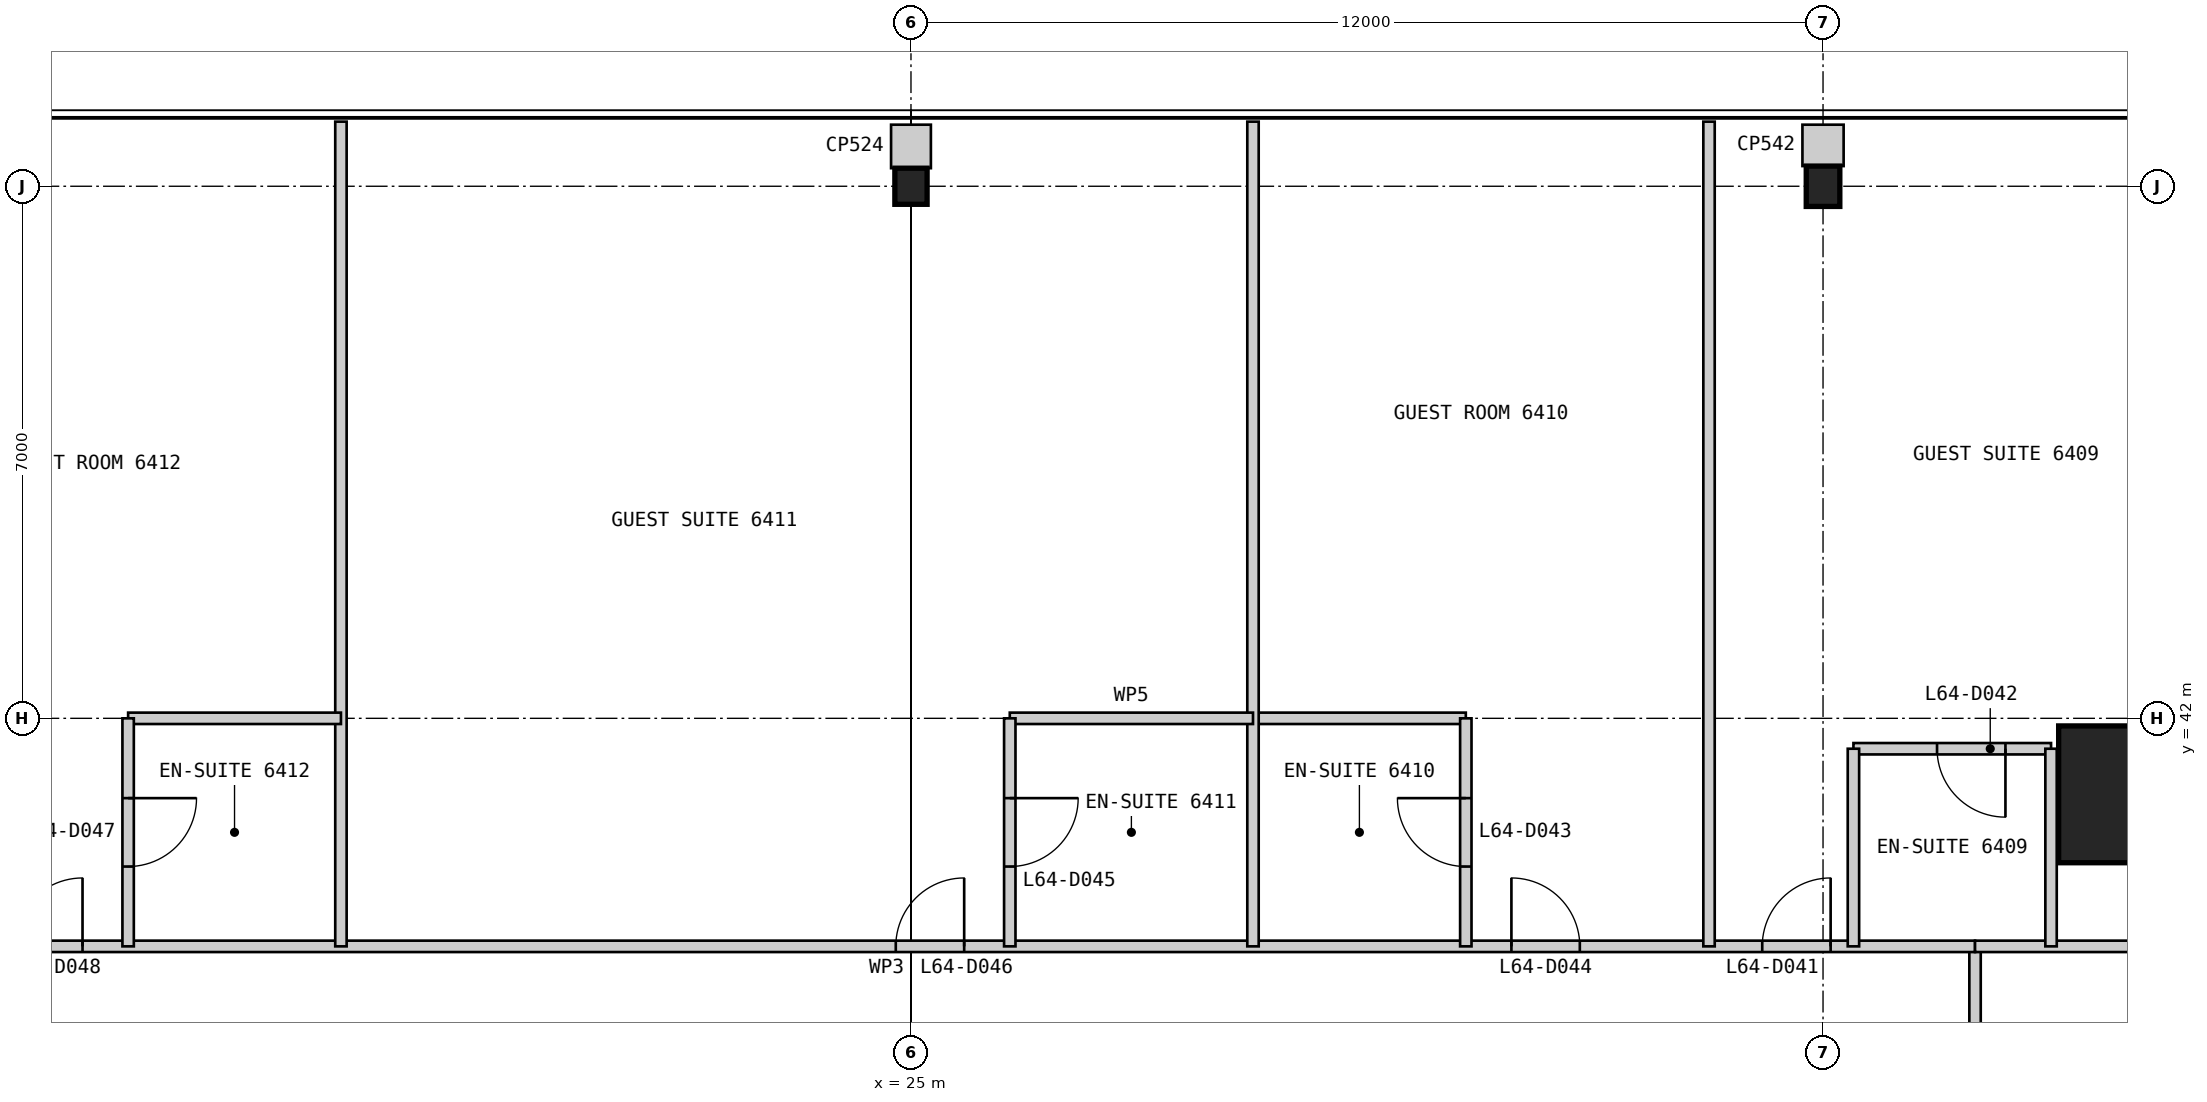
"""IFC4 building model, lengths in metres.
Left out: names, types, materials, properties, quantities, classifications, styles, units other than length and angle.
Written with IfcOpenShell. Run it as: python <this file> out.ifc"""

import sys

from ifc_helpers import new_model, si_unit, direction, frame, frame_2d, origin, origin_2d, place, context, subcontext, project, spatial, rectangle, i_section, extrude, element, fill, save


model = new_model("IFC4")
c1 = context("Model", 3, precision=1e-05, world=origin(), true_north=direction((0.0, 1.0)))
c2 = subcontext(c1, "Body", "Model", "MODEL_VIEW")
j1 = project(units=[si_unit("LENGTHUNIT", "METRE"), si_unit("PLANEANGLEUNIT", "RADIAN")], contexts=[c1])
p1 = place(None, origin())
s1 = spatial("IfcSite", under=j1, at=p1, CompositionType="ELEMENT")
p2 = place(p1, origin())
s2 = spatial("IfcBuilding", under=s1, at=p2, CompositionType="ELEMENT")
p3 = place(p2, frame((0.0, 0.0, 269.6)))
s3 = spatial("IfcBuildingStorey", under=s2, at=p3, CompositionType="ELEMENT", Elevation=269.6)
p4 = place(p3, frame((41.0, 41.0, 0.0), z_axis=(0.0, 0.0, 1.0), x_axis=(1.0, 0.0, 0.0)))
e1 = element("IfcColumn", 1, at=p4, inside=s3, PredefinedType="COLUMN", context=c2, shape_type="SweptSolid", body=[
    extrude(rectangle(XDim=1.8, YDim=1.8, at=origin_2d()), origin(), (0.0, 0.0, 1.0), 3.4),
])
p5 = place(p3, frame((37.0, 49.0, 0.0), z_axis=(0.0, 0.0, 1.0), x_axis=(1.0, 0.0, 0.0)))
e2 = element("IfcColumn", 2, at=p5, inside=s3, PredefinedType="COLUMN", context=c2, shape_type="SweptSolid", body=[
    extrude(i_section(OverallWidth=0.442, OverallDepth=0.531, WebThickness=0.066, FlangeThickness=0.106, at=origin_2d()), origin(), (0.0, 0.0, 1.0), 3.4),
])
p6 = place(p3, frame((25.0, 49.0, 0.0), z_axis=(0.0, 0.0, 1.0), x_axis=(1.0, 0.0, 0.0)))
e3 = element("IfcColumn", 3, at=p6, inside=s3, PredefinedType="COLUMN", context=c2, shape_type="SweptSolid", body=[
    extrude(i_section(OverallWidth=0.424, OverallDepth=0.475, WebThickness=0.048, FlangeThickness=0.077, at=origin_2d()), origin(), (0.0, 0.0, 1.0), 3.4),
])
p7 = place(p3, frame((39.0, 11.0, 0.0), z_axis=(0.0, 0.0, 1.0), x_axis=(0.0, 1.0, 0.0)))
e4 = element("IfcWall", 4, at=p7, inside=s3, PredefinedType="PARTITIONING", context=c2, shape_type="SweptSolid", body=[
    extrude(rectangle(XDim=28.0, YDim=0.15, at=frame_2d((14.0, 0.0))), origin(), (0.0, 0.0, 1.0), 2.844),
])
p8 = place(p7, frame((2.075, 0.0, 0.0)))
e5 = element("IfcOpeningElement", 5, at=p8, cuts=e4, PredefinedType="OPENING", context=c2, shape_type="SweptSolid", body=[
    extrude(rectangle(XDim=0.9, YDim=2.1, at=frame_2d((0.45, 1.05))), frame((0.0, 0.085, 0.0), z_axis=(0.0, -1.0, 0.0), x_axis=(1.0, 0.0, 0.0)), (0.0, 0.0, 1.0), 0.17),
])
p9 = place(p7, frame((5.2, 0.0, 0.0)))
e6 = element("IfcOpeningElement", 6, at=p9, cuts=e4, PredefinedType="OPENING", context=c2, shape_type="SweptSolid", body=[
    extrude(rectangle(XDim=0.9, YDim=2.1, at=frame_2d((0.45, 1.05))), frame((0.0, 0.085, 0.0), z_axis=(0.0, -1.0, 0.0), x_axis=(1.0, 0.0, 0.0)), (0.0, 0.0, 1.0), 0.17),
])
p10 = place(p7, frame((13.3, 0.0, 0.0)))
e7 = element("IfcOpeningElement", 7, at=p10, cuts=e4, PredefinedType="OPENING", context=c2, shape_type="SweptSolid", body=[
    extrude(rectangle(XDim=0.9, YDim=2.1, at=frame_2d((0.45, 1.05))), frame((0.0, 0.085, 0.0), z_axis=(0.0, -1.0, 0.0), x_axis=(1.0, 0.0, 0.0)), (0.0, 0.0, 1.0), 0.17),
])
p11 = place(p7, frame((24.9, 0.0, 0.0)))
e8 = element("IfcOpeningElement", 8, at=p11, cuts=e4, PredefinedType="OPENING", context=c2, shape_type="SweptSolid", body=[
    extrude(rectangle(XDim=0.9, YDim=2.1, at=frame_2d((0.45, 1.05))), frame((0.0, 0.085, 0.0), z_axis=(0.0, -1.0, 0.0), x_axis=(1.0, 0.0, 0.0)), (0.0, 0.0, 1.0), 0.17),
])
p12 = place(p3, frame((39.0, 39.0, 0.0), z_axis=(0.0, 0.0, 1.0), x_axis=(-1.0, 0.0, 0.0)))
e9 = element("IfcWall", 9, at=p12, inside=s3, PredefinedType="PARTITIONING", context=c2, shape_type="SweptSolid", body=[
    extrude(rectangle(XDim=28.0, YDim=0.15, at=frame_2d((14.0, 0.0))), origin(), (0.0, 0.0, 1.0), 2.844),
])
p13 = place(p12, frame((1.9, 0.0, 0.0)))
e10 = element("IfcOpeningElement", 10, at=p13, cuts=e9, PredefinedType="OPENING", context=c2, shape_type="SweptSolid", body=[
    extrude(rectangle(XDim=0.9, YDim=2.1, at=frame_2d((0.45, 1.05))), frame((0.0, 0.085, 0.0), z_axis=(0.0, -1.0, 0.0), x_axis=(1.0, 0.0, 0.0)), (0.0, 0.0, 1.0), 0.17),
])
p14 = place(p12, frame((5.2, 0.0, 0.0)))
e11 = element("IfcOpeningElement", 11, at=p14, cuts=e9, PredefinedType="OPENING", context=c2, shape_type="SweptSolid", body=[
    extrude(rectangle(XDim=0.9, YDim=2.1, at=frame_2d((0.45, 1.05))), frame((0.0, 0.085, 0.0), z_axis=(0.0, -1.0, 0.0), x_axis=(1.0, 0.0, 0.0)), (0.0, 0.0, 1.0), 0.17),
])
p15 = place(p12, frame((13.3, 0.0, 0.0)))
e12 = element("IfcOpeningElement", 12, at=p15, cuts=e9, PredefinedType="OPENING", context=c2, shape_type="SweptSolid", body=[
    extrude(rectangle(XDim=0.9, YDim=2.1, at=frame_2d((0.45, 1.05))), frame((0.0, 0.085, 0.0), z_axis=(0.0, -1.0, 0.0), x_axis=(1.0, 0.0, 0.0)), (0.0, 0.0, 1.0), 0.17),
])
p16 = place(p12, frame((24.9, 0.0, 0.0)))
e13 = element("IfcOpeningElement", 13, at=p16, cuts=e9, PredefinedType="OPENING", context=c2, shape_type="SweptSolid", body=[
    extrude(rectangle(XDim=0.9, YDim=2.1, at=frame_2d((0.45, 1.05))), frame((0.0, 0.085, 0.0), z_axis=(0.0, -1.0, 0.0), x_axis=(1.0, 0.0, 0.0)), (0.0, 0.0, 1.0), 0.17),
])
p17 = place(p3, frame((49.85, 39.0, 0.0), z_axis=(0.0, 0.0, 1.0), x_axis=(-1.0, 0.0, 0.0)))
e14 = element("IfcWall", 14, at=p17, inside=s3, PredefinedType="PARTITIONING", context=c2, shape_type="SweptSolid", body=[
    extrude(rectangle(XDim=10.85, YDim=0.15, at=frame_2d((5.425, 0.0))), origin(), (0.0, 0.0, 1.0), 2.844),
])
p18 = place(p3, frame((40.0, 41.6, 0.0), z_axis=(0.0, 0.0, 1.0), x_axis=(-1.0, 0.0, 0.0)))
e15 = element("IfcWall", 15, at=p18, inside=s3, PredefinedType="PARTITIONING", context=c2, shape_type="SweptSolid", body=[
    extrude(rectangle(XDim=2.6, YDim=0.15, at=frame_2d((1.3, 0.0))), origin(), (0.0, 0.0, 1.0), 3.25),
])
p19 = place(p18, frame((0.6, 0.0, 0.0)))
e16 = element("IfcOpeningElement", 16, at=p19, cuts=e15, PredefinedType="OPENING", context=c2, shape_type="SweptSolid", body=[
    extrude(rectangle(XDim=0.9, YDim=2.1, at=frame_2d((0.45, 1.05))), frame((0.0, 0.085, 0.0), z_axis=(0.0, -1.0, 0.0), x_axis=(1.0, 0.0, 0.0)), (0.0, 0.0, 1.0), 0.17),
])
for number, where, z_axis, x_axis in (
    (17, (40.0, 41.6, 0.0), (0.0, 0.0, 1.0), (0.0, -1.0, 0.0)),
    (18, (37.4, 41.6, 0.0), (0.0, 0.0, 1.0), (0.0, -1.0, 0.0)),
):
    element("IfcWall", number, at=place(p3, frame(where, z_axis=z_axis, x_axis=x_axis)), inside=s3, PredefinedType="PARTITIONING", context=c2, shape_type="SweptSolid", body=[
        extrude(rectangle(XDim=2.6, YDim=0.15, at=frame_2d((1.3, 0.0))), origin(), (0.0, 0.0, 1.0), 3.25),
    ])
p20 = place(p3, frame((35.5, 49.85, 0.0), z_axis=(0.0, 0.0, 1.0), x_axis=(0.0, -1.0, 0.0)))
e19 = element("IfcWall", 19, at=p20, inside=s3, PredefinedType="PARTITIONING", context=c2, shape_type="SweptSolid", body=[
    extrude(rectangle(XDim=10.85, YDim=0.15, at=frame_2d((5.425, 0.0))), origin(), (0.0, 0.0, 1.0), 3.25),
])
p21 = place(p3, frame((32.3, 42.0, 0.0), z_axis=(0.0, 0.0, 1.0), x_axis=(-1.0, 0.0, 0.0)))
e20 = element("IfcWall", 20, at=p21, inside=s3, PredefinedType="PARTITIONING", context=c2, shape_type="SweptSolid", body=[
    extrude(rectangle(XDim=2.8, YDim=0.15, at=frame_2d((1.4, 0.0))), origin(), (0.0, 0.0, 1.0), 3.25),
])
p22 = place(p3, frame((32.3, 42.0, 0.0), z_axis=(0.0, 0.0, 1.0), x_axis=(0.0, -1.0, 0.0)))
e21 = element("IfcWall", 21, at=p22, inside=s3, PredefinedType="PARTITIONING", context=c2, shape_type="SweptSolid", body=[
    extrude(rectangle(XDim=3.0, YDim=0.15, at=frame_2d((1.5, 0.0))), origin(), (0.0, 0.0, 1.0), 3.25),
])
p23 = place(p22, frame((1.05, 0.0, 0.0)))
e22 = element("IfcOpeningElement", 22, at=p23, cuts=e21, PredefinedType="OPENING", context=c2, shape_type="SweptSolid", body=[
    extrude(rectangle(XDim=0.9, YDim=2.1, at=frame_2d((0.45, 1.05))), frame((0.0, 0.085, 0.0), z_axis=(0.0, -1.0, 0.0), x_axis=(1.0, 0.0, 0.0)), (0.0, 0.0, 1.0), 0.17),
])
p24 = place(p3, frame((29.5, 49.85, 0.0), z_axis=(0.0, 0.0, 1.0), x_axis=(0.0, -1.0, 0.0)))
e23 = element("IfcWall", 23, at=p24, inside=s3, PredefinedType="PARTITIONING", context=c2, shape_type="SweptSolid", body=[
    extrude(rectangle(XDim=10.85, YDim=0.15, at=frame_2d((5.425, 0.0))), origin(), (0.0, 0.0, 1.0), 3.25),
])
p25 = place(p3, frame((29.5, 42.0, 0.0), z_axis=(0.0, 0.0, 1.0), x_axis=(-1.0, 0.0, 0.0)))
e24 = element("IfcWall", 24, at=p25, inside=s3, PredefinedType="PARTITIONING", context=c2, shape_type="SweptSolid", body=[
    extrude(rectangle(XDim=3.2, YDim=0.15, at=frame_2d((1.6, 0.0))), origin(), (0.0, 0.0, 1.0), 3.25),
])
p26 = place(p3, frame((26.3, 42.0, 0.0), z_axis=(0.0, 0.0, 1.0), x_axis=(0.0, -1.0, 0.0)))
e25 = element("IfcWall", 25, at=p26, inside=s3, PredefinedType="PARTITIONING", context=c2, shape_type="SweptSolid", body=[
    extrude(rectangle(XDim=3.0, YDim=0.15, at=frame_2d((1.5, 0.0))), origin(), (0.0, 0.0, 1.0), 3.25),
])
p27 = place(p26, frame((1.05, 0.0, 0.0)))
e26 = element("IfcOpeningElement", 26, at=p27, cuts=e25, PredefinedType="OPENING", context=c2, shape_type="SweptSolid", body=[
    extrude(rectangle(XDim=0.9, YDim=2.1, at=frame_2d((0.45, 1.05))), frame((0.0, 0.085, 0.0), z_axis=(0.0, -1.0, 0.0), x_axis=(1.0, 0.0, 0.0)), (0.0, 0.0, 1.0), 0.17),
])
p28 = place(p3, frame((17.5, 49.85, 0.0), z_axis=(0.0, 0.0, 1.0), x_axis=(0.0, -1.0, 0.0)))
e27 = element("IfcWall", 27, at=p28, inside=s3, PredefinedType="PARTITIONING", context=c2, shape_type="SweptSolid", body=[
    extrude(rectangle(XDim=10.85, YDim=0.15, at=frame_2d((5.425, 0.0))), origin(), (0.0, 0.0, 1.0), 3.25),
])
p29 = place(p3, frame((17.5, 42.0, 0.0), z_axis=(0.0, 0.0, 1.0), x_axis=(-1.0, 0.0, 0.0)))
e28 = element("IfcWall", 28, at=p29, inside=s3, PredefinedType="PARTITIONING", context=c2, shape_type="SweptSolid", body=[
    extrude(rectangle(XDim=2.8, YDim=0.15, at=frame_2d((1.4, 0.0))), origin(), (0.0, 0.0, 1.0), 3.25),
])
p30 = place(p3, frame((14.7, 42.0, 0.0), z_axis=(0.0, 0.0, 1.0), x_axis=(0.0, -1.0, 0.0)))
e29 = element("IfcWall", 29, at=p30, inside=s3, PredefinedType="PARTITIONING", context=c2, shape_type="SweptSolid", body=[
    extrude(rectangle(XDim=3.0, YDim=0.15, at=frame_2d((1.5, 0.0))), origin(), (0.0, 0.0, 1.0), 3.25),
])
p31 = place(p30, frame((1.05, 0.0, 0.0)))
e30 = element("IfcOpeningElement", 30, at=p31, cuts=e29, PredefinedType="OPENING", context=c2, shape_type="SweptSolid", body=[
    extrude(rectangle(XDim=0.9, YDim=2.1, at=frame_2d((0.45, 1.05))), frame((0.0, 0.085, 0.0), z_axis=(0.0, -1.0, 0.0), x_axis=(1.0, 0.0, 0.0)), (0.0, 0.0, 1.0), 0.17),
])
p32 = place(p3, frame((37.0, 49.81, 0.0), z_axis=(0.0, 0.0, 1.0), x_axis=(0.0, -1.0, 0.0)))
e31 = element("IfcWall", 31, at=p32, inside=s3, PredefinedType="PARTITIONING", context=c2, shape_type="SweptSolid", body=[
    extrude(rectangle(XDim=0.545, YDim=0.542, at=frame_2d((0.272, 0.0))), origin(), (0.0, 0.0, 1.0), 3.25),
])
p33 = place(p3, frame((25.0, 49.81, 0.0), z_axis=(0.0, 0.0, 1.0), x_axis=(0.0, -1.0, 0.0)))
e32 = element("IfcWall", 32, at=p33, inside=s3, PredefinedType="PARTITIONING", context=c2, shape_type="SweptSolid", body=[
    extrude(rectangle(XDim=0.573, YDim=0.524, at=frame_2d((0.286, 0.0))), origin(), (0.0, 0.0, 1.0), 3.25),
])
p34 = place(p13, frame((0.9, 0.0, 0.0), z_axis=(0.0, 0.0, 1.0), x_axis=(-1.0, 0.0, 0.0)))
e33 = element("IfcDoor", 33, at=p34, inside=s3, OperationType="SINGLE_SWING_RIGHT", PredefinedType="DOOR", context=c2, shape_type="SweptSolid", body=[
    extrude(rectangle(XDim=0.9, YDim=2.1, at=frame_2d((0.45, 1.05))), frame((0.0, 0.025, 0.0), z_axis=(0.0, -1.0, 0.0), x_axis=(1.0, 0.0, 0.0)), (0.0, 0.0, 1.0), 0.05),
])
fill(e10, e33)
p35 = place(p19, origin())
e34 = element("IfcDoor", 34, at=p35, inside=s3, OperationType="SINGLE_SWING_LEFT", PredefinedType="DOOR", context=c2, shape_type="SweptSolid", body=[
    extrude(rectangle(XDim=0.9, YDim=2.1, at=frame_2d((0.45, 1.05))), frame((0.0, 0.025, 0.0), z_axis=(0.0, -1.0, 0.0), x_axis=(1.0, 0.0, 0.0)), (0.0, 0.0, 1.0), 0.05),
])
fill(e16, e34)
p36 = place(p23, frame((0.9, 0.0, 0.0), z_axis=(0.0, 0.0, 1.0), x_axis=(-1.0, 0.0, 0.0)))
e35 = element("IfcDoor", 35, at=p36, inside=s3, OperationType="SINGLE_SWING_RIGHT", PredefinedType="DOOR", context=c2, shape_type="SweptSolid", body=[
    extrude(rectangle(XDim=0.9, YDim=2.1, at=frame_2d((0.45, 1.05))), frame((0.0, 0.025, 0.0), z_axis=(0.0, -1.0, 0.0), x_axis=(1.0, 0.0, 0.0)), (0.0, 0.0, 1.0), 0.05),
])
fill(e22, e35)
p37 = place(p14, frame((0.9, 0.0, 0.0), z_axis=(0.0, 0.0, 1.0), x_axis=(-1.0, 0.0, 0.0)))
e36 = element("IfcDoor", 36, at=p37, inside=s3, OperationType="SINGLE_SWING_LEFT", PredefinedType="DOOR", context=c2, shape_type="SweptSolid", body=[
    extrude(rectangle(XDim=0.9, YDim=2.1, at=frame_2d((0.45, 1.05))), frame((0.0, 0.025, 0.0), z_axis=(0.0, -1.0, 0.0), x_axis=(1.0, 0.0, 0.0)), (0.0, 0.0, 1.0), 0.05),
])
fill(e11, e36)
p38 = place(p27, origin())
e37 = element("IfcDoor", 37, at=p38, inside=s3, OperationType="SINGLE_SWING_LEFT", PredefinedType="DOOR", context=c2, shape_type="SweptSolid", body=[
    extrude(rectangle(XDim=0.9, YDim=2.1, at=frame_2d((0.45, 1.05))), frame((0.0, 0.025, 0.0), z_axis=(0.0, -1.0, 0.0), x_axis=(1.0, 0.0, 0.0)), (0.0, 0.0, 1.0), 0.05),
])
fill(e26, e37)
p39 = place(p15, frame((0.9, 0.0, 0.0), z_axis=(0.0, 0.0, 1.0), x_axis=(-1.0, 0.0, 0.0)))
e38 = element("IfcDoor", 38, at=p39, inside=s3, OperationType="SINGLE_SWING_RIGHT", PredefinedType="DOOR", context=c2, shape_type="SweptSolid", body=[
    extrude(rectangle(XDim=0.9, YDim=2.1, at=frame_2d((0.45, 1.05))), frame((0.0, 0.025, 0.0), z_axis=(0.0, -1.0, 0.0), x_axis=(1.0, 0.0, 0.0)), (0.0, 0.0, 1.0), 0.05),
])
fill(e12, e38)
p40 = place(p31, origin())
e39 = element("IfcDoor", 39, at=p40, inside=s3, OperationType="SINGLE_SWING_LEFT", PredefinedType="DOOR", context=c2, shape_type="SweptSolid", body=[
    extrude(rectangle(XDim=0.9, YDim=2.1, at=frame_2d((0.45, 1.05))), frame((0.0, 0.025, 0.0), z_axis=(0.0, -1.0, 0.0), x_axis=(1.0, 0.0, 0.0)), (0.0, 0.0, 1.0), 0.05),
])
fill(e30, e39)
p41 = place(p16, frame((0.9, 0.0, 0.0), z_axis=(0.0, 0.0, 1.0), x_axis=(-1.0, 0.0, 0.0)))
e40 = element("IfcDoor", 40, at=p41, inside=s3, OperationType="SINGLE_SWING_RIGHT", PredefinedType="DOOR", context=c2, shape_type="SweptSolid", body=[
    extrude(rectangle(XDim=0.9, YDim=2.1, at=frame_2d((0.45, 1.05))), frame((0.0, 0.025, 0.0), z_axis=(0.0, -1.0, 0.0), x_axis=(1.0, 0.0, 0.0)), (0.0, 0.0, 1.0), 0.05),
])
fill(e13, e40)
save(model, sys.argv[1])
